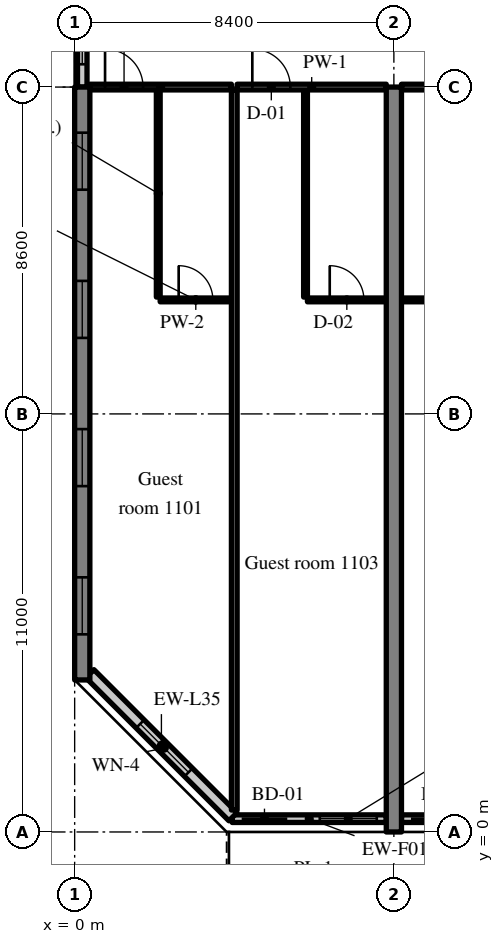
"""IFC4 building model, lengths in metres.
Left out: names, types, materials, properties, quantities, classifications, styles, units other than length and angle.
Written with IfcOpenShell. Run it as: python <this file> out.ifc"""

import sys

from ifc_helpers import new_model, si_unit, direction, frame, frame_2d, origin, place, context, subcontext, project, spatial, rectangle, extrude, source, transform, mapped, element, fill, save


model = new_model("IFC4")
c1 = context("Model", 3, precision=1e-05, world=origin(), true_north=direction((0.0, 1.0)))
c2 = subcontext(c1, "Body", "Model", "MODEL_VIEW")
j1 = project(units=[si_unit("LENGTHUNIT", "METRE"), si_unit("PLANEANGLEUNIT", "RADIAN")], contexts=[c1])
p1 = place(None, origin())
s1 = spatial("IfcSite", under=j1, at=p1, CompositionType="ELEMENT")
p2 = place(p1, origin())
s2 = spatial("IfcBuilding", under=s1, at=p2, CompositionType="ELEMENT")
p3 = place(p2, frame((0.0, 0.0, 50.6)))
s3 = spatial("IfcBuildingStorey", under=s2, at=p3, CompositionType="ELEMENT", Elevation=50.6)
m1 = source(origin(), c2, "Body", "SweptSolid", [
    extrude(rectangle(XDim=15.6, YDim=0.4, at=frame_2d((7.8, 0.0))), origin(), (0.0, 0.0, 1.0), 3.52),
])
p4 = place(p3, frame((0.2, 4.0, 0.0), z_axis=(0.0, 0.0, 1.0), x_axis=(0.0, 1.0, 0.0)))
e1 = element("IfcWall", 1, at=p4, inside=s3, PredefinedType="SHEAR", context=c2, shape_type="MappedRepresentation", body=[
    mapped(m1, transform((0.0, 0.0, 0.0), scale=1.0)),
])
m2 = source(origin(), c2, "Body", "SweptSolid", [
    extrude(rectangle(XDim=1.5, YDim=1.5, at=frame_2d((0.75, 0.75))), frame((0.0, 0.21, 0.0), z_axis=(0.0, -1.0, 0.0), x_axis=(1.0, 0.0, 0.0)), (0.0, 0.0, 1.0), 0.42),
])
p5 = place(p4, frame((1.2, 0.0, 0.9)))
e2 = element("IfcOpeningElement", 2, at=p5, cuts=e1, PredefinedType="OPENING", context=c2, shape_type="MappedRepresentation", body=[
    mapped(m2, transform((0.0, 0.0, 0.0), scale=1.0)),
])
p6 = place(p4, frame((5.1, 0.0, 0.9)))
e3 = element("IfcOpeningElement", 3, at=p6, cuts=e1, PredefinedType="OPENING", context=c2, shape_type="MappedRepresentation", body=[
    mapped(m2, transform((0.0, 0.0, 0.0), scale=1.0)),
])
p7 = place(p4, frame((9.0, 0.0, 0.9)))
e4 = element("IfcOpeningElement", 4, at=p7, cuts=e1, PredefinedType="OPENING", context=c2, shape_type="MappedRepresentation", body=[
    mapped(m2, transform((0.0, 0.0, 0.0), scale=1.0)),
])
p8 = place(p4, frame((12.9, 0.0, 0.9)))
e5 = element("IfcOpeningElement", 5, at=p8, cuts=e1, PredefinedType="OPENING", context=c2, shape_type="MappedRepresentation", body=[
    mapped(m2, transform((0.0, 0.0, 0.0), scale=1.0)),
])
m3 = source(origin(), c2, "Body", "SweptSolid", [
    extrude(rectangle(XDim=19.6, YDim=0.4, at=frame_2d((9.8, 0.0))), origin(), (0.0, 0.0, 1.0), 3.52),
])
p9 = place(p3, frame((8.4, 0.0, 0.0), z_axis=(0.0, 0.0, 1.0), x_axis=(0.0, 1.0, 0.0)))
e6 = element("IfcWall", 6, at=p9, inside=s3, PredefinedType="SHEAR", context=c2, shape_type="MappedRepresentation", body=[
    mapped(m3, transform((0.0, 0.0, 0.0), scale=1.0)),
])
m4 = source(origin(), c2, "Body", "SweptSolid", [
    extrude(rectangle(XDim=4.055, YDim=0.2, at=frame_2d((2.027, 0.0))), origin(), (0.0, 0.0, 1.0), 2.82),
])
p10 = place(p3, frame((4.145, 0.35, 0.0), z_axis=(0.0, 0.0, 1.0), x_axis=(1.0, 0.0, 0.0)))
e7 = element("IfcWall", 7, at=p10, inside=s3, PredefinedType="SOLIDWALL", context=c2, shape_type="MappedRepresentation", body=[
    mapped(m4, transform((0.0, 0.0, 0.0), scale=1.0)),
])
m5 = source(origin(), c2, "Body", "SweptSolid", [
    extrude(rectangle(XDim=1.2, YDim=2.4, at=frame_2d((0.6, 1.2))), frame((0.0, 0.11, 0.0), z_axis=(0.0, -1.0, 0.0), x_axis=(1.0, 0.0, 0.0)), (0.0, 0.0, 1.0), 0.22),
])
p11 = place(p10, frame((0.25, 0.0, 0.0)))
e8 = element("IfcOpeningElement", 8, at=p11, cuts=e7, PredefinedType="OPENING", context=c2, shape_type="MappedRepresentation", body=[
    mapped(m5, transform((0.0, 0.0, 0.0), scale=1.0)),
])
m6 = source(origin(), c2, "Body", "SweptSolid", [
    extrude(rectangle(XDim=1.5, YDim=1.5, at=frame_2d((0.75, 0.75))), frame((0.0, 0.11, 0.0), z_axis=(0.0, -1.0, 0.0), x_axis=(1.0, 0.0, 0.0)), (0.0, 0.0, 1.0), 0.22),
])
p12 = place(p10, frame((2.305, 0.0, 0.9)))
e9 = element("IfcOpeningElement", 9, at=p12, cuts=e7, PredefinedType="OPENING", context=c2, shape_type="MappedRepresentation", body=[
    mapped(m6, transform((0.0, 0.0, 0.0), scale=1.0)),
])
m7 = source(origin(), c2, "Body", "SweptSolid", [
    extrude(rectangle(XDim=3.6, YDim=0.2, at=frame_2d((1.8, 0.0))), origin(), (0.0, 0.0, 1.0), 2.82),
])
p13 = place(p3, frame((8.6, 0.35, 0.0), z_axis=(0.0, 0.0, 1.0), x_axis=(1.0, 0.0, 0.0)))
e10 = element("IfcWall", 10, at=p13, inside=s3, PredefinedType="SOLIDWALL", context=c2, shape_type="MappedRepresentation", body=[
    mapped(m7, transform((0.0, 0.0, 0.0), scale=1.0)),
])
p14 = place(p13, frame((0.25, 0.0, 0.0)))
e11 = element("IfcOpeningElement", 11, at=p14, cuts=e10, PredefinedType="OPENING", context=c2, shape_type="MappedRepresentation", body=[
    mapped(m5, transform((0.0, 0.0, 0.0), scale=1.0)),
])
p15 = place(p13, frame((1.85, 0.0, 0.9)))
e12 = element("IfcOpeningElement", 12, at=p15, cuts=e10, PredefinedType="OPENING", context=c2, shape_type="MappedRepresentation", body=[
    mapped(m6, transform((0.0, 0.0, 0.0), scale=1.0)),
])
m8 = source(origin(), c2, "Body", "SweptSolid", [
    extrude(rectangle(XDim=5.326, YDim=0.3, at=frame_2d((2.663, 0.0))), origin(), (0.0, 0.0, 1.0), 3.52),
])
p16 = place(p3, frame((0.4, 4.166, 0.0), z_axis=(0.0, 0.0, 1.0), x_axis=(0.707106781187, -0.707106781187, 0.0)))
e13 = element("IfcWall", 13, at=p16, inside=s3, PredefinedType="SOLIDWALL", context=c2, shape_type="MappedRepresentation", body=[
    mapped(m8, transform((0.0, 0.0, 0.0), scale=1.0)),
])
m9 = source(origin(), c2, "Body", "SweptSolid", [
    extrude(rectangle(XDim=1.8, YDim=1.5, at=frame_2d((0.9, 0.75))), frame((0.0, 0.16, 0.0), z_axis=(0.0, -1.0, 0.0), x_axis=(1.0, 0.0, 0.0)), (0.0, 0.0, 1.0), 0.32),
])
p17 = place(p16, frame((1.871, 0.0, 0.9)))
e14 = element("IfcOpeningElement", 14, at=p17, cuts=e13, PredefinedType="OPENING", context=c2, shape_type="MappedRepresentation", body=[
    mapped(m9, transform((0.0, 0.0, 0.0), scale=1.0)),
])
m10 = source(origin(), c2, "Body", "SweptSolid", [
    extrude(rectangle(XDim=2.4, YDim=0.25, at=frame_2d((1.2, 0.0))), origin(), (0.0, 0.0, 1.0), 2.62),
])
p18 = place(p3, frame((0.2, 19.6, 0.0), z_axis=(0.0, 0.0, 1.0), x_axis=(0.0, 1.0, 0.0)))
e15 = element("IfcWall", 15, at=p18, inside=s3, PredefinedType="SOLIDWALL", context=c2, shape_type="MappedRepresentation", body=[
    mapped(m10, transform((0.0, 0.0, 0.0), scale=1.0)),
])
m11 = source(origin(), c2, "Body", "SweptSolid", [
    extrude(rectangle(XDim=1.2, YDim=1.5, at=frame_2d((0.6, 0.75))), frame((0.0, 0.135, 0.0), z_axis=(0.0, -1.0, 0.0), x_axis=(1.0, 0.0, 0.0)), (0.0, 0.0, 1.0), 0.27),
])
p19 = place(p18, frame((0.6, 0.0, 0.9)))
e16 = element("IfcOpeningElement", 16, at=p19, cuts=e15, PredefinedType="OPENING", context=c2, shape_type="MappedRepresentation", body=[
    mapped(m11, transform((0.0, 0.0, 0.0), scale=1.0)),
])
m12 = source(origin(), c2, "Body", "SweptSolid", [
    extrude(rectangle(XDim=5.45, YDim=0.1, at=frame_2d((2.725, 0.0))), origin(), (0.0, 0.0, 1.0), 3.52),
])
p20 = place(p3, frame((2.2, 14.075, 0.0), z_axis=(0.0, 0.0, 1.0), x_axis=(0.0, 1.0, 0.0)))
e17 = element("IfcWall", 17, at=p20, inside=s3, PredefinedType="PARTITIONING", context=c2, shape_type="MappedRepresentation", body=[
    mapped(m12, transform((0.0, 0.0, 0.0), scale=1.0)),
])
m13 = source(origin(), c2, "Body", "SweptSolid", [
    extrude(rectangle(XDim=1.875, YDim=0.1, at=frame_2d((0.938, 0.0))), origin(), (0.0, 0.0, 1.0), 3.52),
])
p21 = place(p3, frame((2.25, 14.0, 0.0), z_axis=(0.0, 0.0, 1.0), x_axis=(1.0, 0.0, 0.0)))
e18 = element("IfcWall", 18, at=p21, inside=s3, PredefinedType="PARTITIONING", context=c2, shape_type="MappedRepresentation", body=[
    mapped(m13, transform((0.0, 0.0, 0.0), scale=1.0)),
])
m14 = source(origin(), c2, "Body", "SweptSolid", [
    extrude(rectangle(XDim=0.9, YDim=2.1, at=frame_2d((0.45, 1.05))), frame((0.0, 0.06, 0.0), z_axis=(0.0, -1.0, 0.0), x_axis=(1.0, 0.0, 0.0)), (0.0, 0.0, 1.0), 0.12),
])
p22 = place(p21, frame((0.487, 0.0, 0.0)))
e19 = element("IfcOpeningElement", 19, at=p22, cuts=e18, PredefinedType="OPENING", context=c2, shape_type="MappedRepresentation", body=[
    mapped(m14, transform((0.0, 0.0, 0.0), scale=1.0)),
])
m15 = source(origin(), c2, "Body", "SweptSolid", [
    extrude(rectangle(XDim=3.725, YDim=0.15, at=frame_2d((1.863, 0.0))), origin(), (0.0, 0.0, 1.0), 2.82),
])
p23 = place(p3, frame((0.4, 19.6, 0.0), z_axis=(0.0, 0.0, 1.0), x_axis=(1.0, 0.0, 0.0)))
e20 = element("IfcWall", 20, at=p23, inside=s3, PredefinedType="PARTITIONING", context=c2, shape_type="MappedRepresentation", body=[
    mapped(m15, transform((0.0, 0.0, 0.0), scale=1.0)),
])
m16 = source(origin(), c2, "Body", "SweptSolid", [
    extrude(rectangle(XDim=1.0, YDim=2.1, at=frame_2d((0.5, 1.05))), frame((0.0, 0.085, 0.0), z_axis=(0.0, -1.0, 0.0), x_axis=(1.0, 0.0, 0.0)), (0.0, 0.0, 1.0), 0.17),
])
p24 = place(p23, frame((0.4, 0.0, 0.0)))
e21 = element("IfcOpeningElement", 21, at=p24, cuts=e20, PredefinedType="OPENING", context=c2, shape_type="MappedRepresentation", body=[
    mapped(m16, transform((0.0, 0.0, 0.0), scale=1.0)),
])
p25 = place(p3, frame((6.075, 14.075, 0.0), z_axis=(0.0, 0.0, 1.0), x_axis=(0.0, 1.0, 0.0)))
e22 = element("IfcWall", 22, at=p25, inside=s3, PredefinedType="PARTITIONING", context=c2, shape_type="MappedRepresentation", body=[
    mapped(m12, transform((0.0, 0.0, 0.0), scale=1.0)),
])
m17 = source(origin(), c2, "Body", "SweptSolid", [
    extrude(rectangle(XDim=2.075, YDim=0.1, at=frame_2d((1.038, 0.0))), origin(), (0.0, 0.0, 1.0), 3.52),
])
p26 = place(p3, frame((6.125, 14.0, 0.0), z_axis=(0.0, 0.0, 1.0), x_axis=(1.0, 0.0, 0.0)))
e23 = element("IfcWall", 23, at=p26, inside=s3, PredefinedType="PARTITIONING", context=c2, shape_type="MappedRepresentation", body=[
    mapped(m17, transform((0.0, 0.0, 0.0), scale=1.0)),
])
p27 = place(p26, frame((0.587, 0.0, 0.0)))
e24 = element("IfcOpeningElement", 24, at=p27, cuts=e23, PredefinedType="OPENING", context=c2, shape_type="MappedRepresentation", body=[
    mapped(m14, transform((0.0, 0.0, 0.0), scale=1.0)),
])
m18 = source(origin(), c2, "Body", "SweptSolid", [
    extrude(rectangle(XDim=3.925, YDim=0.15, at=frame_2d((1.962, 0.0))), origin(), (0.0, 0.0, 1.0), 2.82),
])
p28 = place(p3, frame((4.275, 19.6, 0.0), z_axis=(0.0, 0.0, 1.0), x_axis=(1.0, 0.0, 0.0)))
e25 = element("IfcWall", 25, at=p28, inside=s3, PredefinedType="PARTITIONING", context=c2, shape_type="MappedRepresentation", body=[
    mapped(m18, transform((0.0, 0.0, 0.0), scale=1.0)),
])
p29 = place(p28, frame((0.4, 0.0, 0.0)))
e26 = element("IfcOpeningElement", 26, at=p29, cuts=e25, PredefinedType="OPENING", context=c2, shape_type="MappedRepresentation", body=[
    mapped(m16, transform((0.0, 0.0, 0.0), scale=1.0)),
])
m19 = source(origin(), c2, "Body", "SweptSolid", [
    extrude(rectangle(XDim=18.947, YDim=0.15, at=frame_2d((9.474, 0.0))), origin(), (0.0, 0.0, 1.0), 3.52),
])
p30 = place(p3, frame((4.2, 0.578, 0.0), z_axis=(0.0, 0.0, 1.0), x_axis=(0.0, 1.0, 0.0)))
e27 = element("IfcWall", 27, at=p30, inside=s3, PredefinedType="PARTITIONING", context=c2, shape_type="MappedRepresentation", body=[
    mapped(m19, transform((0.0, 0.0, 0.0), scale=1.0)),
])
m20 = source(origin(), c2, "Body", "SweptSolid", [
    extrude(rectangle(XDim=2.55, YDim=0.1, at=frame_2d((1.275, 0.0))), origin(), (0.0, 0.0, 1.0), 3.52),
])
p31 = place(p3, frame((8.6, 14.0, 0.0), z_axis=(0.0, 0.0, 1.0), x_axis=(1.0, 0.0, 0.0)))
e28 = element("IfcWall", 28, at=p31, inside=s3, PredefinedType="PARTITIONING", context=c2, shape_type="MappedRepresentation", body=[
    mapped(m20, transform((0.0, 0.0, 0.0), scale=1.0)),
])
p32 = place(p31, frame((0.825, 0.0, 0.0)))
e29 = element("IfcOpeningElement", 29, at=p32, cuts=e28, PredefinedType="OPENING", context=c2, shape_type="MappedRepresentation", body=[
    mapped(m14, transform((0.0, 0.0, 0.0), scale=1.0)),
])
m21 = source(origin(), c2, "Body", "SweptSolid", [
    extrude(rectangle(XDim=8.0, YDim=0.15, at=frame_2d((4.0, 0.0))), origin(), (0.0, 0.0, 1.0), 2.82),
])
p33 = place(p3, frame((8.6, 19.6, 0.0), z_axis=(0.0, 0.0, 1.0), x_axis=(1.0, 0.0, 0.0)))
e30 = element("IfcWall", 30, at=p33, inside=s3, PredefinedType="PARTITIONING", context=c2, shape_type="MappedRepresentation", body=[
    mapped(m21, transform((0.0, 0.0, 0.0), scale=1.0)),
])
p34 = place(p33, frame((6.6, 0.0, 0.0)))
e31 = element("IfcOpeningElement", 31, at=p34, cuts=e30, PredefinedType="OPENING", context=c2, shape_type="MappedRepresentation", body=[
    mapped(m16, transform((0.0, 0.0, 0.0), scale=1.0)),
])
m22 = source(origin(), c2, "Body", "SweptSolid", [
    extrude(rectangle(XDim=1.2, YDim=2.4, at=frame_2d((0.6, 1.2))), frame((0.0, 0.025, 0.0), z_axis=(0.0, -1.0, 0.0), x_axis=(1.0, 0.0, 0.0)), (0.0, 0.0, 1.0), 0.05),
])
p35 = place(p11, origin())
e32 = element("IfcDoor", 32, at=p35, inside=s3, OperationType="SLIDING_TO_LEFT", PredefinedType="DOOR", context=c2, shape_type="MappedRepresentation", body=[
    mapped(m22, transform((0.0, 0.0, 0.0), scale=1.0)),
])
fill(e8, e32)
m23 = source(origin(), c2, "Body", "SweptSolid", [
    extrude(rectangle(XDim=1.5, YDim=1.5, at=frame_2d((0.75, 0.75))), frame((0.0, 0.03, 0.0), z_axis=(0.0, -1.0, 0.0), x_axis=(1.0, 0.0, 0.0)), (0.0, 0.0, 1.0), 0.06),
])
p36 = place(p12, origin())
e33 = element("IfcWindow", 33, at=p36, inside=s3, PartitioningType="SINGLE_PANEL", PredefinedType="WINDOW", context=c2, shape_type="MappedRepresentation", body=[
    mapped(m23, transform((0.0, 0.0, 0.0), scale=1.0)),
])
fill(e9, e33)
p37 = place(p14, origin())
e34 = element("IfcDoor", 34, at=p37, inside=s3, OperationType="SLIDING_TO_RIGHT", PredefinedType="DOOR", context=c2, shape_type="MappedRepresentation", body=[
    mapped(m22, transform((0.0, 0.0, 0.0), scale=1.0)),
])
fill(e11, e34)
m24 = source(origin(), c2, "Body", "SweptSolid", [
    extrude(rectangle(XDim=1.8, YDim=1.5, at=frame_2d((0.9, 0.75))), frame((0.0, 0.03, 0.0), z_axis=(0.0, -1.0, 0.0), x_axis=(1.0, 0.0, 0.0)), (0.0, 0.0, 1.0), 0.06),
])
p38 = place(p17, origin())
e35 = element("IfcWindow", 35, at=p38, inside=s3, PartitioningType="SINGLE_PANEL", PredefinedType="WINDOW", context=c2, shape_type="MappedRepresentation", body=[
    mapped(m24, transform((0.0, 0.0, 0.0), scale=1.0)),
])
fill(e14, e35)
p39 = place(p5, origin())
e36 = element("IfcWindow", 36, at=p39, inside=s3, PartitioningType="SINGLE_PANEL", PredefinedType="WINDOW", context=c2, shape_type="MappedRepresentation", body=[
    mapped(m23, transform((0.0, 0.0, 0.0), scale=1.0)),
])
fill(e2, e36)
p40 = place(p6, origin())
e37 = element("IfcWindow", 37, at=p40, inside=s3, PartitioningType="SINGLE_PANEL", PredefinedType="WINDOW", context=c2, shape_type="MappedRepresentation", body=[
    mapped(m23, transform((0.0, 0.0, 0.0), scale=1.0)),
])
fill(e3, e37)
p41 = place(p7, origin())
e38 = element("IfcWindow", 38, at=p41, inside=s3, PartitioningType="SINGLE_PANEL", PredefinedType="WINDOW", context=c2, shape_type="MappedRepresentation", body=[
    mapped(m23, transform((0.0, 0.0, 0.0), scale=1.0)),
])
fill(e4, e38)
p42 = place(p8, origin())
e39 = element("IfcWindow", 39, at=p42, inside=s3, PartitioningType="SINGLE_PANEL", PredefinedType="WINDOW", context=c2, shape_type="MappedRepresentation", body=[
    mapped(m23, transform((0.0, 0.0, 0.0), scale=1.0)),
])
fill(e5, e39)
m25 = source(origin(), c2, "Body", "SweptSolid", [
    extrude(rectangle(XDim=1.2, YDim=1.5, at=frame_2d((0.6, 0.75))), frame((0.0, 0.03, 0.0), z_axis=(0.0, -1.0, 0.0), x_axis=(1.0, 0.0, 0.0)), (0.0, 0.0, 1.0), 0.06),
])
p43 = place(p19, origin())
e40 = element("IfcWindow", 40, at=p43, inside=s3, PartitioningType="SINGLE_PANEL", PredefinedType="WINDOW", context=c2, shape_type="MappedRepresentation", body=[
    mapped(m25, transform((0.0, 0.0, 0.0), scale=1.0)),
])
fill(e16, e40)
m26 = source(origin(), c2, "Body", "SweptSolid", [
    extrude(rectangle(XDim=0.9, YDim=2.1, at=frame_2d((0.45, 1.05))), frame((0.0, 0.025, 0.0), z_axis=(0.0, -1.0, 0.0), x_axis=(1.0, 0.0, 0.0)), (0.0, 0.0, 1.0), 0.05),
])
p44 = place(p22, origin())
e41 = element("IfcDoor", 41, at=p44, inside=s3, OperationType="SINGLE_SWING_LEFT", PredefinedType="DOOR", context=c2, shape_type="MappedRepresentation", body=[
    mapped(m26, transform((0.0, 0.0, 0.0), scale=1.0)),
])
fill(e19, e41)
m27 = source(origin(), c2, "Body", "SweptSolid", [
    extrude(rectangle(XDim=1.0, YDim=2.1, at=frame_2d((0.5, 1.05))), frame((0.0, 0.025, 0.0), z_axis=(0.0, -1.0, 0.0), x_axis=(1.0, 0.0, 0.0)), (0.0, 0.0, 1.0), 0.05),
])
p45 = place(p24, origin())
e42 = element("IfcDoor", 42, at=p45, inside=s3, OperationType="SINGLE_SWING_LEFT", PredefinedType="DOOR", context=c2, shape_type="MappedRepresentation", body=[
    mapped(m27, transform((0.0, 0.0, 0.0), scale=1.0)),
])
fill(e21, e42)
p46 = place(p27, origin())
e43 = element("IfcDoor", 43, at=p46, inside=s3, OperationType="SINGLE_SWING_LEFT", PredefinedType="DOOR", context=c2, shape_type="MappedRepresentation", body=[
    mapped(m26, transform((0.0, 0.0, 0.0), scale=1.0)),
])
fill(e24, e43)
p47 = place(p29, origin())
e44 = element("IfcDoor", 44, at=p47, inside=s3, OperationType="SINGLE_SWING_LEFT", PredefinedType="DOOR", context=c2, shape_type="MappedRepresentation", body=[
    mapped(m27, transform((0.0, 0.0, 0.0), scale=1.0)),
])
fill(e26, e44)
save(model, sys.argv[1])
